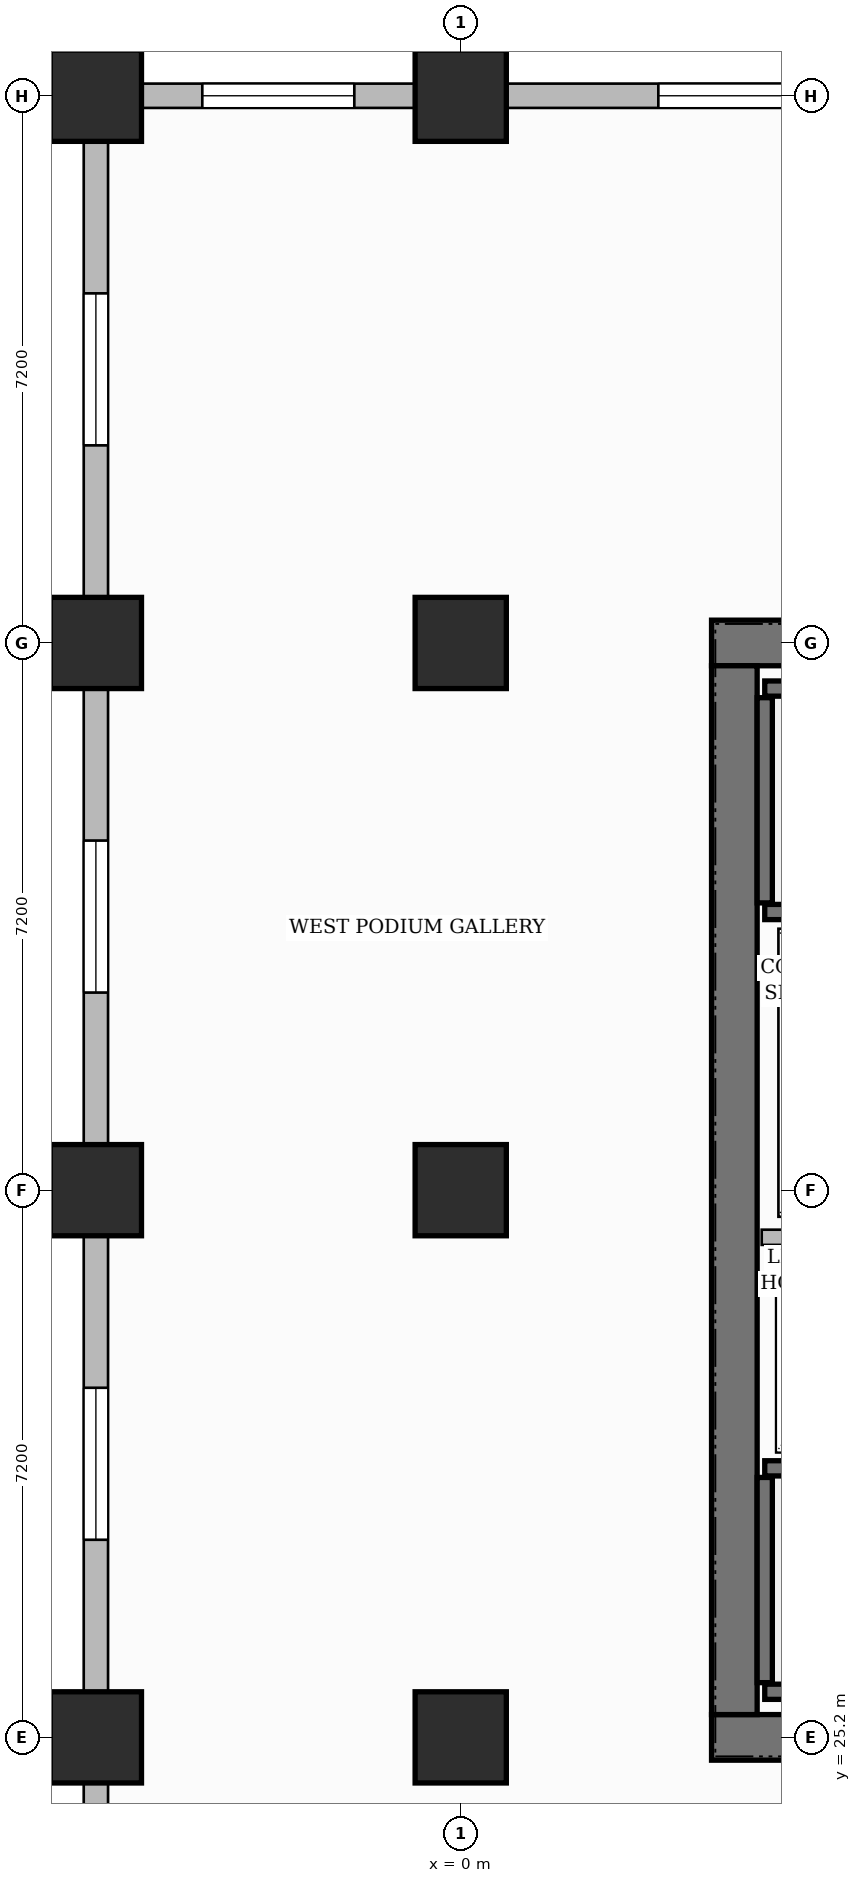
"""IFC4 building model, lengths in metres.
Left out: names, types, materials, properties, quantities, classifications, styles, units other than length and angle.
Written with IfcOpenShell. Run it as: python <this file> out.ifc"""

import sys

from ifc_helpers import new_model, si_unit, direction, frame, frame_2d, origin, origin_2d, place, context, subcontext, project, spatial, rectangle, extrude, source, transform, mapped, element, fill, save


model = new_model("IFC4")
c1 = context("Model", 3, precision=1e-05, world=origin(), true_north=direction((0.0, 1.0)))
c2 = subcontext(c1, "Body", "Model", "MODEL_VIEW")
j1 = project(units=[si_unit("LENGTHUNIT", "METRE"), si_unit("PLANEANGLEUNIT", "RADIAN")], contexts=[c1])
p1 = place(None, origin())
s1 = spatial("IfcSite", under=j1, at=p1, CompositionType="ELEMENT")
p2 = place(p1, origin())
s2 = spatial("IfcBuilding", under=s1, at=p2, CompositionType="ELEMENT")
p3 = place(p2, frame((0.0, 0.0, 21.6)))
s3 = spatial("IfcBuildingStorey", under=s2, at=p3, CompositionType="ELEMENT", Elevation=21.6)
for number, where, z_axis, x_axis in (
    (1, (3.3, 25.2, 0.0), (0.0, 0.0, 1.0), (1.0, 0.0, 0.0)),
    (2, (3.3, 39.6, 0.0), (0.0, 0.0, 1.0), (1.0, 0.0, 0.0)),
):
    element("IfcWall", number, at=place(p3, frame(where, z_axis=z_axis, x_axis=x_axis)), inside=s3, PredefinedType="SHEAR", context=c2, shape_type="SweptSolid", body=[
        extrude(rectangle(XDim=8.4, YDim=0.6, at=frame_2d((4.2, 0.0))), origin(), (0.0, 0.0, 1.0), 5.4),
    ])
p4 = place(p3, frame((3.6, 25.5, 0.0), z_axis=(0.0, 0.0, 1.0), x_axis=(0.0, 1.0, 0.0)))
e3 = element("IfcWall", 3, at=p4, inside=s3, PredefinedType="SHEAR", context=c2, shape_type="SweptSolid", body=[
    extrude(rectangle(XDim=13.8, YDim=0.6, at=frame_2d((6.9, 0.0))), origin(), (0.0, 0.0, 1.0), 5.4),
])
m1 = source(origin(), c2, "Body", "SweptSolid", [
    extrude(rectangle(XDim=1.2, YDim=1.2, at=origin_2d()), origin(), (0.0, 0.0, 1.0), 5.4),
])
for number, where, z_axis, x_axis in (
    (4, (-4.8, 25.2, 0.0), (0.0, 0.0, 1.0), (1.0, 0.0, 0.0)),
    (5, (-4.8, 32.4, 0.0), (0.0, 0.0, 1.0), (1.0, 0.0, 0.0)),
    (6, (-4.8, 39.6, 0.0), (0.0, 0.0, 1.0), (1.0, 0.0, 0.0)),
    (7, (-4.8, 46.8, 0.0), (0.0, 0.0, 1.0), (1.0, 0.0, 0.0)),
    (8, (0.0, 25.2, 0.0), (0.0, 0.0, 1.0), (1.0, 0.0, 0.0)),
    (9, (0.0, 32.4, 0.0), (0.0, 0.0, 1.0), (1.0, 0.0, 0.0)),
    (10, (0.0, 39.6, 0.0), (0.0, 0.0, 1.0), (1.0, 0.0, 0.0)),
    (11, (0.0, 46.8, 0.0), (0.0, 0.0, 1.0), (1.0, 0.0, 0.0)),
):
    element("IfcColumn", number, at=place(p3, frame(where, z_axis=z_axis, x_axis=x_axis)), inside=s3, PredefinedType="COLUMN", context=c2, shape_type="MappedRepresentation", body=[
        mapped(m1, transform((0.0, 0.0, 0.0), scale=1.0)),
    ])
p5 = place(p3, frame((4.0, 25.8, 0.0), z_axis=(0.0, 0.0, 1.0), x_axis=(1.0, 0.0, 0.0)))
e12 = element("IfcWall", 12, at=p5, inside=s3, PredefinedType="SHEAR", context=c2, shape_type="SweptSolid", body=[
    extrude(rectangle(XDim=7.1, YDim=0.2, at=frame_2d((3.55, 0.0))), origin(), (0.0, 0.0, 1.0), 5.4),
])
p6 = place(p3, frame((4.0, 25.92, 0.0), z_axis=(0.0, 0.0, 1.0), x_axis=(0.0, 1.0, 0.0)))
e13 = element("IfcWall", 13, at=p6, inside=s3, PredefinedType="SHEAR", context=c2, shape_type="SweptSolid", body=[
    extrude(rectangle(XDim=2.7, YDim=0.2, at=frame_2d((1.35, 0.0))), origin(), (0.0, 0.0, 1.0), 5.4),
])
p7 = place(p3, frame((4.0, 28.74, 0.0), z_axis=(0.0, 0.0, 1.0), x_axis=(1.0, 0.0, 0.0)))
e14 = element("IfcWall", 14, at=p7, inside=s3, PredefinedType="SHEAR", context=c2, shape_type="SweptSolid", body=[
    extrude(rectangle(XDim=7.1, YDim=0.2, at=frame_2d((3.55, 0.0))), origin(), (0.0, 0.0, 1.0), 5.4),
])
p8 = place(p7, frame((5.815, 0.0, 0.0)))
e15 = element("IfcOpeningElement", 15, at=p8, cuts=e14, PredefinedType="OPENING", context=c2, shape_type="SweptSolid", body=[
    extrude(rectangle(XDim=1.05, YDim=2.2, at=frame_2d((0.525, 1.1))), frame((0.0, 0.11, 0.0), z_axis=(0.0, -1.0, 0.0), x_axis=(1.0, 0.0, 0.0)), (0.0, 0.0, 1.0), 0.22),
])
p9 = place(p3, frame((4.0, 39.0, 0.0), z_axis=(0.0, 0.0, 1.0), x_axis=(1.0, 0.0, 0.0)))
e16 = element("IfcWall", 16, at=p9, inside=s3, PredefinedType="SHEAR", context=c2, shape_type="SweptSolid", body=[
    extrude(rectangle(XDim=7.1, YDim=0.2, at=frame_2d((3.55, 0.0))), origin(), (0.0, 0.0, 1.0), 5.4),
])
p10 = place(p3, frame((4.0, 36.18, 0.0), z_axis=(0.0, 0.0, 1.0), x_axis=(0.0, 1.0, 0.0)))
e17 = element("IfcWall", 17, at=p10, inside=s3, PredefinedType="SHEAR", context=c2, shape_type="SweptSolid", body=[
    extrude(rectangle(XDim=2.7, YDim=0.2, at=frame_2d((1.35, 0.0))), origin(), (0.0, 0.0, 1.0), 5.4),
])
p11 = place(p3, frame((4.0, 36.06, 0.0), z_axis=(0.0, 0.0, 1.0), x_axis=(1.0, 0.0, 0.0)))
e18 = element("IfcWall", 18, at=p11, inside=s3, PredefinedType="SHEAR", context=c2, shape_type="SweptSolid", body=[
    extrude(rectangle(XDim=7.1, YDim=0.2, at=frame_2d((3.55, 0.0))), origin(), (0.0, 0.0, 1.0), 5.4),
])
p12 = place(p11, frame((5.815, 0.0, 0.0)))
e19 = element("IfcOpeningElement", 19, at=p12, cuts=e18, PredefinedType="OPENING", context=c2, shape_type="SweptSolid", body=[
    extrude(rectangle(XDim=1.05, YDim=2.2, at=frame_2d((0.525, 1.1))), frame((0.0, 0.11, 0.0), z_axis=(0.0, -1.0, 0.0), x_axis=(1.0, 0.0, 0.0)), (0.0, 0.0, 1.0), 0.22),
])
p13 = place(p3, frame((3.96, 31.78, 0.0), z_axis=(0.0, 0.0, 1.0), x_axis=(1.0, 0.0, 0.0)))
e20 = element("IfcWall", 20, at=p13, inside=s3, PredefinedType="PARTITIONING", context=c2, shape_type="SweptSolid", body=[
    extrude(rectangle(XDim=2.13, YDim=0.2, at=frame_2d((1.065, 0.0))), origin(), (0.0, 0.0, 1.0), 5.1),
])
p14 = place(p3, frame((-4.8, 46.8, 0.0), z_axis=(0.0, 0.0, 1.0), x_axis=(1.0, 0.0, 0.0)))
e21 = element("IfcWall", 21, at=p14, inside=s3, PredefinedType="SOLIDWALL", context=c2, shape_type="SweptSolid", body=[
    extrude(rectangle(XDim=33.6, YDim=0.32, at=frame_2d((16.8, 0.0))), origin(), (0.0, 0.0, 1.0), 4.085),
])
p15 = place(p14, frame((1.4, 0.0, 0.75)))
e22 = element("IfcOpeningElement", 22, at=p15, cuts=e21, PredefinedType="OPENING", context=c2, shape_type="SweptSolid", body=[
    extrude(rectangle(XDim=2.0, YDim=2.6, at=frame_2d((1.0, 1.3))), frame((0.0, 0.17, 0.0), z_axis=(0.0, -1.0, 0.0), x_axis=(1.0, 0.0, 0.0)), (0.0, 0.0, 1.0), 0.34),
])
p16 = place(p14, frame((7.4, 0.0, 0.75)))
e23 = element("IfcOpeningElement", 23, at=p16, cuts=e21, PredefinedType="OPENING", context=c2, shape_type="SweptSolid", body=[
    extrude(rectangle(XDim=2.0, YDim=2.6, at=frame_2d((1.0, 1.3))), frame((0.0, 0.17, 0.0), z_axis=(0.0, -1.0, 0.0), x_axis=(1.0, 0.0, 0.0)), (0.0, 0.0, 1.0), 0.34),
])
p17 = place(p14, frame((14.6, 0.0, 0.75)))
e24 = element("IfcOpeningElement", 24, at=p17, cuts=e21, PredefinedType="OPENING", context=c2, shape_type="SweptSolid", body=[
    extrude(rectangle(XDim=2.0, YDim=2.6, at=frame_2d((1.0, 1.3))), frame((0.0, 0.17, 0.0), z_axis=(0.0, -1.0, 0.0), x_axis=(1.0, 0.0, 0.0)), (0.0, 0.0, 1.0), 0.34),
])
p18 = place(p14, frame((29.0, 0.0, 0.75)))
e25 = element("IfcOpeningElement", 25, at=p18, cuts=e21, PredefinedType="OPENING", context=c2, shape_type="SweptSolid", body=[
    extrude(rectangle(XDim=2.0, YDim=2.6, at=frame_2d((1.0, 1.3))), frame((0.0, 0.17, 0.0), z_axis=(0.0, -1.0, 0.0), x_axis=(1.0, 0.0, 0.0)), (0.0, 0.0, 1.0), 0.34),
])
p19 = place(p3, frame((-4.8, 0.05, 0.0), z_axis=(0.0, 0.0, 1.0), x_axis=(0.0, 1.0, 0.0)))
e26 = element("IfcWall", 26, at=p19, inside=s3, PredefinedType="SOLIDWALL", context=c2, shape_type="SweptSolid", body=[
    extrude(rectangle(XDim=46.7, YDim=0.32, at=frame_2d((23.35, 0.0))), origin(), (0.0, 0.0, 1.0), 5.1),
])
p20 = place(p19, frame((2.55, 0.0, 0.75)))
e27 = element("IfcOpeningElement", 27, at=p20, cuts=e26, PredefinedType="OPENING", context=c2, shape_type="SweptSolid", body=[
    extrude(rectangle(XDim=2.0, YDim=2.6, at=frame_2d((1.0, 1.3))), frame((0.0, 0.17, 0.0), z_axis=(0.0, -1.0, 0.0), x_axis=(1.0, 0.0, 0.0)), (0.0, 0.0, 1.0), 0.34),
])
p21 = place(p19, frame((9.75, 0.0, 0.75)))
e28 = element("IfcOpeningElement", 28, at=p21, cuts=e26, PredefinedType="OPENING", context=c2, shape_type="SweptSolid", body=[
    extrude(rectangle(XDim=2.0, YDim=2.6, at=frame_2d((1.0, 1.3))), frame((0.0, 0.17, 0.0), z_axis=(0.0, -1.0, 0.0), x_axis=(1.0, 0.0, 0.0)), (0.0, 0.0, 1.0), 0.34),
])
p22 = place(p19, frame((16.95, 0.0, 0.75)))
e29 = element("IfcOpeningElement", 29, at=p22, cuts=e26, PredefinedType="OPENING", context=c2, shape_type="SweptSolid", body=[
    extrude(rectangle(XDim=2.0, YDim=2.6, at=frame_2d((1.0, 1.3))), frame((0.0, 0.17, 0.0), z_axis=(0.0, -1.0, 0.0), x_axis=(1.0, 0.0, 0.0)), (0.0, 0.0, 1.0), 0.34),
])
p23 = place(p19, frame((27.75, 0.0, 0.75)))
e30 = element("IfcOpeningElement", 30, at=p23, cuts=e26, PredefinedType="OPENING", context=c2, shape_type="SweptSolid", body=[
    extrude(rectangle(XDim=2.0, YDim=2.6, at=frame_2d((1.0, 1.3))), frame((0.0, 0.17, 0.0), z_axis=(0.0, -1.0, 0.0), x_axis=(1.0, 0.0, 0.0)), (0.0, 0.0, 1.0), 0.34),
])
p24 = place(p19, frame((34.95, 0.0, 0.75)))
e31 = element("IfcOpeningElement", 31, at=p24, cuts=e26, PredefinedType="OPENING", context=c2, shape_type="SweptSolid", body=[
    extrude(rectangle(XDim=2.0, YDim=2.6, at=frame_2d((1.0, 1.3))), frame((0.0, 0.17, 0.0), z_axis=(0.0, -1.0, 0.0), x_axis=(1.0, 0.0, 0.0)), (0.0, 0.0, 1.0), 0.34),
])
p25 = place(p19, frame((42.15, 0.0, 0.75)))
e32 = element("IfcOpeningElement", 32, at=p25, cuts=e26, PredefinedType="OPENING", context=c2, shape_type="SweptSolid", body=[
    extrude(rectangle(XDim=2.0, YDim=2.6, at=frame_2d((1.0, 1.3))), frame((0.0, 0.17, 0.0), z_axis=(0.0, -1.0, 0.0), x_axis=(1.0, 0.0, 0.0)), (0.0, 0.0, 1.0), 0.34),
])
m2 = source(origin(), c2, "Body", "SweptSolid", [
    extrude(rectangle(XDim=2.0, YDim=2.6, at=frame_2d((1.0, 1.3))), frame((0.0, 0.03, 0.0), z_axis=(0.0, -1.0, 0.0), x_axis=(1.0, 0.0, 0.0)), (0.0, 0.0, 1.0), 0.06),
])
p26 = place(p15, origin())
e33 = element("IfcWindow", 33, at=p26, inside=s3, PartitioningType="DOUBLE_PANEL_VERTICAL", PredefinedType="WINDOW", context=c2, shape_type="MappedRepresentation", body=[
    mapped(m2, transform((0.0, 0.0, 0.0), scale=1.0)),
])
fill(e22, e33)
p27 = place(p16, origin())
e34 = element("IfcWindow", 34, at=p27, inside=s3, PartitioningType="DOUBLE_PANEL_VERTICAL", PredefinedType="WINDOW", context=c2, shape_type="MappedRepresentation", body=[
    mapped(m2, transform((0.0, 0.0, 0.0), scale=1.0)),
])
fill(e23, e34)
p28 = place(p23, origin())
e35 = element("IfcWindow", 35, at=p28, inside=s3, PartitioningType="DOUBLE_PANEL_VERTICAL", PredefinedType="WINDOW", context=c2, shape_type="MappedRepresentation", body=[
    mapped(m2, transform((0.0, 0.0, 0.0), scale=1.0)),
])
fill(e30, e35)
p29 = place(p24, origin())
e36 = element("IfcWindow", 36, at=p29, inside=s3, PartitioningType="DOUBLE_PANEL_VERTICAL", PredefinedType="WINDOW", context=c2, shape_type="MappedRepresentation", body=[
    mapped(m2, transform((0.0, 0.0, 0.0), scale=1.0)),
])
fill(e31, e36)
p30 = place(p25, origin())
e37 = element("IfcWindow", 37, at=p30, inside=s3, PartitioningType="DOUBLE_PANEL_VERTICAL", PredefinedType="WINDOW", context=c2, shape_type="MappedRepresentation", body=[
    mapped(m2, transform((0.0, 0.0, 0.0), scale=1.0)),
])
fill(e32, e37)
save(model, sys.argv[1])
